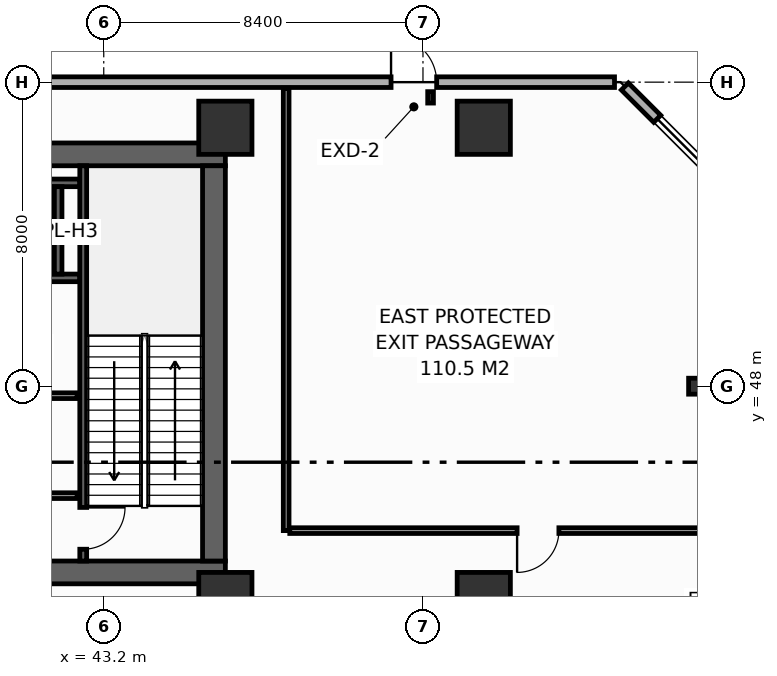
"""IFC4 building model, lengths in metres.
Left out: names, types, materials, properties, quantities, classifications, styles, units other than length and angle.
Written with IfcOpenShell. Run it as: python <this file> out.ifc"""

import sys

from ifc_helpers import new_model, si_unit, direction, frame, frame_2d, origin, origin_2d, place, context, subcontext, project, spatial, rectangle, hollow_rectangle, i_section, extrude, element, fill, save


model = new_model("IFC4")
c1 = context("Model", 3, precision=1e-05, world=origin(), true_north=direction((0.0, 1.0)))
c2 = subcontext(c1, "Body", "Model", "MODEL_VIEW")
j1 = project(units=[si_unit("LENGTHUNIT", "METRE"), si_unit("PLANEANGLEUNIT", "RADIAN")], contexts=[c1])
p1 = place(None, origin())
s1 = spatial("IfcSite", under=j1, at=p1, CompositionType="ELEMENT")
p2 = place(p1, origin())
s2 = spatial("IfcBuilding", under=s1, at=p2, CompositionType="ELEMENT")
p3 = place(p2, origin())
s3 = spatial("IfcBuildingStorey", under=s2, at=p3, CompositionType="ELEMENT", Elevation=0.0)
p4 = place(p3, frame((13.5, 43.1, 0.0), z_axis=(0.0, 0.0, 1.0), x_axis=(1.0, 0.0, 0.0)))
e1 = element("IfcWall", 1, at=p4, inside=s3, PredefinedType="SHEAR", context=c2, shape_type="SweptSolid", body=[
    extrude(rectangle(XDim=32.9, YDim=0.6, at=frame_2d((16.45, 0.0))), origin(), (0.0, 0.0, 1.0), 5.7),
])
p5 = place(p4, frame((5.4, 0.0, 0.0)))
e2 = element("IfcOpeningElement", 2, at=p5, cuts=e1, PredefinedType="OPENING", context=c2, shape_type="SweptSolid", body=[
    extrude(rectangle(XDim=1.1, YDim=2.15, at=frame_2d((0.55, 1.075))), frame((0.0, 0.31, 0.0), z_axis=(0.0, -1.0, 0.0), x_axis=(1.0, 0.0, 0.0)), (0.0, 0.0, 1.0), 0.62),
])
p6 = place(p4, frame((25.6, 0.0, 0.0)))
e3 = element("IfcOpeningElement", 3, at=p6, cuts=e1, PredefinedType="OPENING", context=c2, shape_type="SweptSolid", body=[
    extrude(rectangle(XDim=1.1, YDim=2.15, at=frame_2d((0.55, 1.075))), frame((0.0, 0.31, 0.0), z_axis=(0.0, -1.0, 0.0), x_axis=(1.0, 0.0, 0.0)), (0.0, 0.0, 1.0), 0.62),
])
p7 = place(p3, frame((13.5, 54.1, 0.0), z_axis=(0.0, 0.0, 1.0), x_axis=(1.0, 0.0, 0.0)))
e4 = element("IfcWall", 4, at=p7, inside=s3, PredefinedType="SHEAR", context=c2, shape_type="SweptSolid", body=[
    extrude(rectangle(XDim=32.9, YDim=0.6, at=frame_2d((16.45, 0.0))), origin(), (0.0, 0.0, 1.0), 5.7),
])
p8 = place(p3, frame((46.1, 43.4, 0.0), z_axis=(0.0, 0.0, 1.0), x_axis=(0.0, 1.0, 0.0)))
e5 = element("IfcWall", 5, at=p8, inside=s3, PredefinedType="SHEAR", context=c2, shape_type="SweptSolid", body=[
    extrude(rectangle(XDim=10.4, YDim=0.6, at=frame_2d((5.2, 0.0))), origin(), (0.0, 0.0, 1.0), 5.7),
])
for number, where, z_axis, x_axis in (
    (6, (46.4, 54.8, 0.0), (0.0, 0.0, 1.0), (1.0, 0.0, 0.0)),
    (7, (53.2, 54.8, 0.0), (0.0, 0.0, 1.0), (1.0, 0.0, 0.0)),
    (8, (46.4, 42.4, 0.0), (0.0, 0.0, 1.0), (1.0, 0.0, 0.0)),
    (9, (53.2, 42.4, 0.0), (0.0, 0.0, 1.0), (1.0, 0.0, 0.0)),
):
    element("IfcColumn", number, at=place(p3, frame(where, z_axis=z_axis, x_axis=x_axis)), inside=s3, PredefinedType="COLUMN", context=c2, shape_type="SweptSolid", body=[
        extrude(hollow_rectangle(XDim=1.4, YDim=1.4, WallThickness=0.065, at=origin_2d()), origin(), (0.0, 0.0, 1.0), 6.0),
    ])
p9 = place(p3, frame((58.8, 48.0, 0.0), z_axis=(0.0, 0.0, 1.0), x_axis=(1.0, 0.0, 0.0)))
e10 = element("IfcColumn", 10, at=p9, inside=s3, PredefinedType="COLUMN", context=c2, shape_type="SweptSolid", body=[
    extrude(i_section(OverallWidth=0.42, OverallDepth=0.42, WebThickness=0.02, FlangeThickness=0.035, FilletRadius=0.022, at=origin_2d()), origin(), (0.0, 0.0, 1.0), 6.0),
])
p10 = place(p3, frame((51.8, 55.6, 0.0), z_axis=(0.0, 0.0, 1.0), x_axis=(1.0, 0.0, 0.0)))
e11 = element("IfcColumn", 11, at=p10, inside=s3, PredefinedType="PILASTER", context=c2, shape_type="SweptSolid", body=[
    extrude(hollow_rectangle(XDim=0.15, YDim=0.3, WallThickness=0.01, at=origin_2d()), origin(), (0.0, 0.0, 1.0), 6.0),
])
p11 = place(p3, frame((39.525, 50.85, 0.0), z_axis=(0.0, 0.0, 1.0), x_axis=(1.0, 0.0, 0.0)))
e12 = element("IfcWall", 12, at=p11, inside=s3, PredefinedType="SHEAR", context=c2, shape_type="SweptSolid", body=[
    extrude(rectangle(XDim=3.045, YDim=0.2, at=frame_2d((1.522, 0.0))), origin(), (0.0, 0.0, 1.0), 5.7),
])
p12 = place(p11, frame((0.825, 0.0, 0.0)))
e13 = element("IfcOpeningElement", 13, at=p12, cuts=e12, PredefinedType="OPENING", context=c2, shape_type="SweptSolid", body=[
    extrude(rectangle(XDim=1.1, YDim=2.2, at=frame_2d((0.55, 1.1))), frame((0.0, 0.11, 0.0), z_axis=(0.0, -1.0, 0.0), x_axis=(1.0, 0.0, 0.0)), (0.0, 0.0, 1.0), 0.22),
])
p13 = place(p3, frame((39.525, 53.35, 0.0), z_axis=(0.0, 0.0, 1.0), x_axis=(1.0, 0.0, 0.0)))
e14 = element("IfcWall", 14, at=p13, inside=s3, PredefinedType="SHEAR", context=c2, shape_type="SweptSolid", body=[
    extrude(rectangle(XDim=3.045, YDim=0.2, at=frame_2d((1.522, 0.0))), origin(), (0.0, 0.0, 1.0), 5.7),
])
p14 = place(p3, frame((42.0, 50.95, 0.0), z_axis=(0.0, 0.0, 1.0), x_axis=(0.0, 1.0, 0.0)))
e15 = element("IfcWall", 15, at=p14, inside=s3, PredefinedType="SHEAR", context=c2, shape_type="SweptSolid", body=[
    extrude(rectangle(XDim=2.3, YDim=0.2, at=frame_2d((1.15, 0.0))), origin(), (0.0, 0.0, 1.0), 5.7),
])
p15 = place(p3, frame((42.66, 53.8, 0.0), z_axis=(0.0, 0.0, 1.0), x_axis=(0.0, -1.0, 0.0)))
e16 = element("IfcWall", 16, at=p15, inside=s3, PredefinedType="SHEAR", context=c2, shape_type="SweptSolid", body=[
    extrude(rectangle(XDim=10.4, YDim=0.18, at=frame_2d((5.2, 0.0))), origin(), (0.0, 0.0, 1.0), 5.7),
])
p16 = place(p15, frame((8.99, 0.0, 0.0)))
e17 = element("IfcOpeningElement", 17, at=p16, cuts=e16, PredefinedType="OPENING", context=c2, shape_type="SweptSolid", body=[
    extrude(rectangle(XDim=1.1, YDim=2.15, at=frame_2d((0.55, 1.075))), frame((0.0, 0.1, 0.0), z_axis=(0.0, -1.0, 0.0), x_axis=(1.0, 0.0, 0.0)), (0.0, 0.0, 1.0), 0.2),
])
p17 = place(p3, frame((34.05, 45.12, 0.0), z_axis=(0.0, 0.0, 1.0), x_axis=(1.0, 0.0, 0.0)))
e18 = element("IfcWall", 18, at=p17, inside=s3, PredefinedType="PARTITIONING", context=c2, shape_type="SweptSolid", body=[
    extrude(rectangle(XDim=8.45, YDim=0.15, at=frame_2d((4.225, 0.0))), origin(), (0.0, 0.0, 1.0), 5.7),
])
p18 = place(p17, frame((3.6, 0.0, 0.0)))
e19 = element("IfcOpeningElement", 19, at=p18, cuts=e18, PredefinedType="OPENING", context=c2, shape_type="SweptSolid", body=[
    extrude(rectangle(XDim=0.95, YDim=2.15, at=frame_2d((0.475, 1.075))), frame((0.0, 0.085, 0.0), z_axis=(0.0, -1.0, 0.0), x_axis=(1.0, 0.0, 0.0)), (0.0, 0.0, 1.0), 0.17),
])
p19 = place(p3, frame((34.05, 47.75, 0.0), z_axis=(0.0, 0.0, 1.0), x_axis=(1.0, 0.0, 0.0)))
e20 = element("IfcWall", 20, at=p19, inside=s3, PredefinedType="PARTITIONING", context=c2, shape_type="SweptSolid", body=[
    extrude(rectangle(XDim=8.45, YDim=0.15, at=frame_2d((4.225, 0.0))), origin(), (0.0, 0.0, 1.0), 5.7),
])
p20 = place(p3, frame((56.913, 55.887, 0.0), z_axis=(0.0, 0.0, 1.0), x_axis=(0.707106781187, -0.707106781187, 0.0)))
e21 = element("IfcWall", 21, at=p20, inside=s3, PredefinedType="STANDARD", context=c2, shape_type="SweptSolid", body=[
    extrude(rectangle(XDim=4.206, YDim=0.26, at=frame_2d((2.103, 0.0))), origin(), (0.0, 0.0, 1.0), 5.7),
])
p21 = place(p20, frame((1.203, 0.0, 0.9)))
e22 = element("IfcOpeningElement", 22, at=p21, cuts=e21, PredefinedType="OPENING", context=c2, shape_type="SweptSolid", body=[
    extrude(rectangle(XDim=1.8, YDim=1.9, at=frame_2d((0.9, 0.95))), frame((0.0, 0.14, 0.0), z_axis=(0.0, -1.0, 0.0), x_axis=(1.0, 0.0, 0.0)), (0.0, 0.0, 1.0), 0.28),
])
p22 = place(p3, frame((3.36, 56.0, 0.0), z_axis=(0.0, 0.0, 1.0), x_axis=(1.0, 0.0, 0.0)))
e23 = element("IfcWall", 23, at=p22, inside=s3, PredefinedType="STANDARD", context=c2, shape_type="SweptSolid", body=[
    extrude(rectangle(XDim=53.28, YDim=0.28, at=frame_2d((26.64, 0.0))), origin(), (0.0, 0.0, 1.0), 5.7),
])
p23 = place(p22, frame((0.45, 0.0, 0.0)))
e24 = element("IfcOpeningElement", 24, at=p23, cuts=e23, PredefinedType="OPENING", context=c2, shape_type="SweptSolid", body=[
    extrude(rectangle(XDim=1.5, YDim=2.35, at=frame_2d((0.75, 1.175))), frame((0.0, 0.15, 0.0), z_axis=(0.0, -1.0, 0.0), x_axis=(1.0, 0.0, 0.0)), (0.0, 0.0, 1.0), 0.3),
])
p24 = place(p22, frame((47.4, 0.0, 0.0)))
e25 = element("IfcOpeningElement", 25, at=p24, cuts=e23, PredefinedType="OPENING", context=c2, shape_type="SweptSolid", body=[
    extrude(rectangle(XDim=1.2, YDim=2.25, at=frame_2d((0.6, 1.125))), frame((0.0, 0.15, 0.0), z_axis=(0.0, -1.0, 0.0), x_axis=(1.0, 0.0, 0.0)), (0.0, 0.0, 1.0), 0.3),
])
p25 = place(p3, frame((48.0, 44.2, 0.0), z_axis=(0.0, 0.0, 1.0), x_axis=(0.0, 1.0, 0.0)))
e26 = element("IfcWall", 26, at=p25, inside=s3, PredefinedType="PARTITIONING", context=c2, shape_type="SweptSolid", body=[
    extrude(rectangle(XDim=11.64, YDim=0.15, at=frame_2d((5.82, 0.0))), origin(), (0.0, 0.0, 1.0), 4.985),
])
p26 = place(p3, frame((59.84, 44.2, 0.0), z_axis=(0.0, 0.0, 1.0), x_axis=(-1.0, 0.0, 0.0)))
e27 = element("IfcWall", 27, at=p26, inside=s3, PredefinedType="PARTITIONING", context=c2, shape_type="SweptSolid", body=[
    extrude(rectangle(XDim=11.745, YDim=0.15, at=frame_2d((5.873, 0.0))), origin(), (0.0, 0.0, 1.0), 4.785),
])
p27 = place(p26, frame((4.663, 0.0, 0.0)))
e28 = element("IfcOpeningElement", 28, at=p27, cuts=e27, PredefinedType="OPENING", context=c2, shape_type="SweptSolid", body=[
    extrude(rectangle(XDim=1.1, YDim=2.15, at=frame_2d((0.55, 1.075))), frame((0.0, 0.085, 0.0), z_axis=(0.0, -1.0, 0.0), x_axis=(1.0, 0.0, 0.0)), (0.0, 0.0, 1.0), 0.17),
])
p28 = place(p16, origin())
e29 = element("IfcDoor", 29, at=p28, inside=s3, OperationType="SINGLE_SWING_LEFT", PredefinedType="DOOR", context=c2, shape_type="SweptSolid", body=[
    extrude(rectangle(XDim=1.1, YDim=2.15, at=frame_2d((0.55, 1.075))), frame((0.0, 0.025, 0.0), z_axis=(0.0, -1.0, 0.0), x_axis=(1.0, 0.0, 0.0)), (0.0, 0.0, 1.0), 0.05),
])
fill(e17, e29)
p29 = place(p21, origin())
e30 = element("IfcWindow", 30, at=p29, inside=s3, PartitioningType="SINGLE_PANEL", PredefinedType="WINDOW", context=c2, shape_type="SweptSolid", body=[
    extrude(rectangle(XDim=1.8, YDim=1.9, at=frame_2d((0.9, 0.95))), frame((0.0, 0.03, 0.0), z_axis=(0.0, -1.0, 0.0), x_axis=(1.0, 0.0, 0.0)), (0.0, 0.0, 1.0), 0.06),
])
fill(e22, e30)
p30 = place(p24, origin())
e31 = element("IfcDoor", 31, at=p30, inside=s3, OperationType="SINGLE_SWING_LEFT", PredefinedType="DOOR", context=c2, shape_type="SweptSolid", body=[
    extrude(rectangle(XDim=1.2, YDim=2.25, at=frame_2d((0.6, 1.125))), frame((0.0, 0.025, 0.0), z_axis=(0.0, -1.0, 0.0), x_axis=(1.0, 0.0, 0.0)), (0.0, 0.0, 1.0), 0.05),
])
fill(e25, e31)
p31 = place(p27, origin())
e32 = element("IfcDoor", 32, at=p31, inside=s3, OperationType="SINGLE_SWING_RIGHT", PredefinedType="DOOR", context=c2, shape_type="SweptSolid", body=[
    extrude(rectangle(XDim=1.1, YDim=2.15, at=frame_2d((0.55, 1.075))), frame((0.0, 0.025, 0.0), z_axis=(0.0, -1.0, 0.0), x_axis=(1.0, 0.0, 0.0)), (0.0, 0.0, 1.0), 0.05),
])
fill(e28, e32)
save(model, sys.argv[1])
